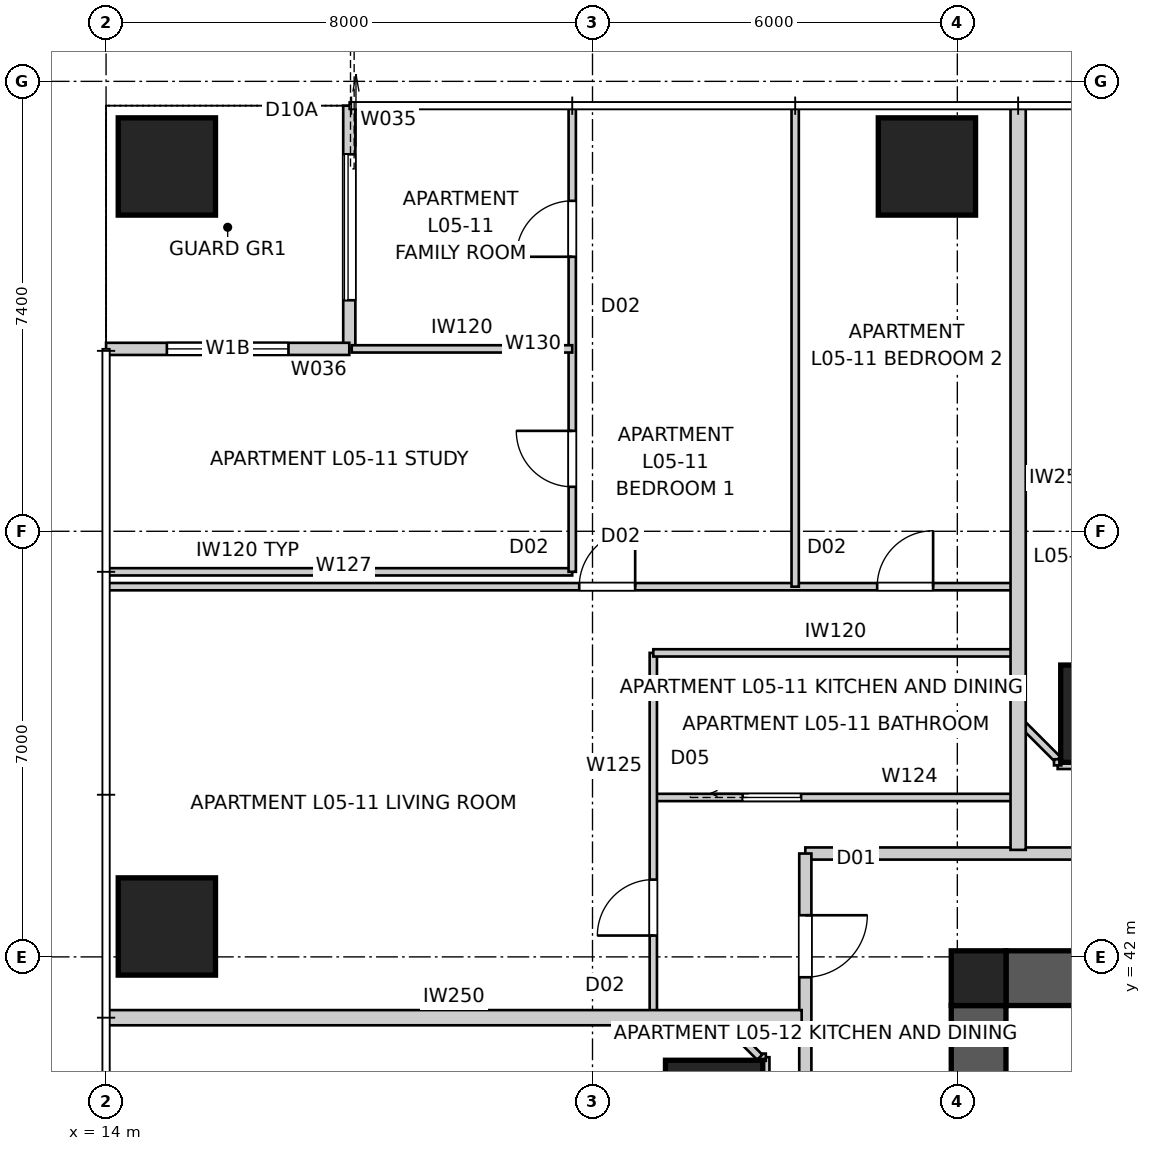
"""IFC4 building model, lengths in metres.
Left out: names, types, materials, properties, quantities, classifications, styles, units other than length and angle.
Written with IfcOpenShell. Run it as: python <this file> out.ifc"""

import sys

from ifc_helpers import new_model, si_unit, direction, frame, frame_2d, origin, origin_2d, place, context, subcontext, project, spatial, polyline, rectangle, outline, extrude, element, fill, save


model = new_model("IFC4")
c1 = context("Model", 3, precision=1e-05, world=origin(), true_north=direction((0.0, 1.0)))
c2 = subcontext(c1, "Body", "Model", "MODEL_VIEW")
j1 = project(units=[si_unit("LENGTHUNIT", "METRE"), si_unit("PLANEANGLEUNIT", "RADIAN")], contexts=[c1])
p1 = place(None, origin())
s1 = spatial("IfcSite", under=j1, at=p1, CompositionType="ELEMENT")
p2 = place(p1, origin())
s2 = spatial("IfcBuilding", under=s1, at=p2, CompositionType="ELEMENT")
p3 = place(p2, frame((0.0, 0.0, 21.8)))
s3 = spatial("IfcBuildingStorey", under=s2, at=p3, CompositionType="ELEMENT", Elevation=21.8)
p4 = place(p3, frame((28.8, 41.65, 0.0), z_axis=(0.0, 0.0, 1.0), x_axis=(1.0, 0.0, 0.0)))
e1 = element("IfcWall", 1, at=p4, inside=s3, PredefinedType="SHEAR", context=c2, shape_type="SweptSolid", body=[
    extrude(outline(polyline([(0.0, -0.45), (22.4, -0.45), (22.4, -0.025), (22.85, -0.025), (22.85, 0.025), (22.4, 0.025), (22.4, 0.45), (0.0, 0.45), (0.0, 0.025), (-0.45, 0.025), (-0.45, -0.025), (0.0, -0.025), (0.0, -0.45)])), origin(), (0.0, 0.0, 1.0), 3.4),
])
p5 = place(p3, frame((28.35, 41.2, 0.0), z_axis=(0.0, 0.0, 1.0), x_axis=(0.0, -1.0, 0.0)))
e2 = element("IfcWall", 2, at=p5, inside=s3, PredefinedType="SHEAR", context=c2, shape_type="SweptSolid", body=[
    extrude(outline(polyline([(0.0, -0.45), (22.4, -0.45), (22.4, -0.025), (22.85, -0.025), (22.85, 0.025), (22.4, 0.025), (22.4, 0.45), (0.0, 0.45), (0.0, 0.025), (-0.45, 0.025), (-0.45, -0.025), (0.0, -0.025), (0.0, -0.45)])), origin(), (0.0, 0.0, 1.0), 3.4),
])
p6 = place(p5, frame((11.14, 0.0, 0.0)))
e3 = element("IfcOpeningElement", 3, at=p6, cuts=e2, PredefinedType="OPENING", context=c2, shape_type="SweptSolid", body=[
    extrude(rectangle(XDim=1.02, YDim=2.4, at=frame_2d((0.51, 1.2))), frame((0.0, 0.46, 0.0), z_axis=(0.0, -1.0, 0.0), x_axis=(1.0, 0.0, 0.0)), (0.0, 0.0, 1.0), 0.92),
])
p7 = place(p3, frame((28.35, 41.65, 0.0), z_axis=(0.0, 0.0, 1.0), x_axis=(1.0, 0.0, 0.0)))
e4 = element("IfcColumn", 4, at=p7, inside=s3, PredefinedType="COLUMN", context=c2, shape_type="SweptSolid", body=[
    extrude(rectangle(XDim=0.9, YDim=0.9, at=origin_2d()), origin(), (0.0, 0.0, 1.0), 3.4),
])
for number, where, z_axis, x_axis in (
    (5, (27.5, 55.0, 0.0), (0.0, 0.0, 1.0), (1.0, 0.0, 0.0)),
    (6, (15.0, 55.0, 0.0), (0.0, 0.0, 1.0), (1.0, 0.0, 0.0)),
    (7, (15.0, 42.5, 0.0), (0.0, 0.0, 1.0), (1.0, 0.0, 0.0)),
    (8, (30.5, 46.0, 0.0), (0.0, 0.0, 1.0), (1.0, 0.0, 0.0)),
    (9, (24.0, 39.5, 0.0), (0.0, 0.0, 1.0), (1.0, 0.0, 0.0)),
):
    element("IfcColumn", number, at=place(p3, frame(where, z_axis=z_axis, x_axis=x_axis)), inside=s3, PredefinedType="COLUMN", context=c2, shape_type="SweptSolid", body=[
        extrude(rectangle(XDim=1.6, YDim=1.6, at=origin_2d()), origin(), (0.0, 0.0, 1.0), 3.4),
    ])
p8 = place(p3, frame((18.0, 56.0, 0.0), z_axis=(0.0, 0.0, 1.0), x_axis=(0.0, -1.0, 0.0)))
e10 = element("IfcWall", 10, at=p8, inside=s3, PredefinedType="SOLIDWALL", context=c2, shape_type="SweptSolid", body=[
    extrude(rectangle(XDim=4.0, YDim=0.2, at=frame_2d((2.0, 0.0))), origin(), (0.0, 0.0, 1.0), 3.25),
])
p9 = place(p8, frame((0.8, 0.0, 0.0)))
e11 = element("IfcOpeningElement", 11, at=p9, cuts=e10, PredefinedType="OPENING", context=c2, shape_type="SweptSolid", body=[
    extrude(rectangle(XDim=2.4, YDim=2.1, at=frame_2d((1.2, 1.05))), frame((0.0, 0.11, 0.0), z_axis=(0.0, -1.0, 0.0), x_axis=(1.0, 0.0, 0.0)), (0.0, 0.0, 1.0), 0.22),
])
p10 = place(p3, frame((18.0, 52.0, 0.0), z_axis=(0.0, 0.0, 1.0), x_axis=(-1.0, 0.0, 0.0)))
e12 = element("IfcWall", 12, at=p10, inside=s3, PredefinedType="SOLIDWALL", context=c2, shape_type="SweptSolid", body=[
    extrude(rectangle(XDim=4.0, YDim=0.2, at=frame_2d((2.0, 0.0))), origin(), (0.0, 0.0, 1.0), 3.25),
])
p11 = place(p10, frame((1.0, 0.0, 0.45)))
e13 = element("IfcOpeningElement", 13, at=p11, cuts=e12, PredefinedType="OPENING", context=c2, shape_type="SweptSolid", body=[
    extrude(rectangle(XDim=2.0, YDim=1.8, at=frame_2d((1.0, 0.9))), frame((0.0, 0.11, 0.0), z_axis=(0.0, -1.0, 0.0), x_axis=(1.0, 0.0, 0.0)), (0.0, 0.0, 1.0), 0.22),
])
p12 = place(p3, frame((54.5, 43.7, 0.0), z_axis=(0.0, 0.0, 1.0), x_axis=(-1.0, 0.0, 0.0)))
e14 = element("IfcWall", 14, at=p12, inside=s3, PredefinedType="PARTITIONING", context=c2, shape_type="SweptSolid", body=[
    extrude(rectangle(XDim=29.0, YDim=0.2, at=frame_2d((14.5, 0.0))), origin(), (0.0, 0.0, 1.0), 3.25),
])
p13 = place(p12, frame((22.253, 0.0, 0.0)))
e15 = element("IfcOpeningElement", 15, at=p13, cuts=e14, PredefinedType="OPENING", context=c2, shape_type="SweptSolid", body=[
    extrude(rectangle(XDim=1.02, YDim=2.34, at=frame_2d((0.51, 1.17))), frame((0.0, 0.11, 0.0), z_axis=(0.0, -1.0, 0.0), x_axis=(1.0, 0.0, 0.0)), (0.0, 0.0, 1.0), 0.22),
])
p14 = place(p12, frame((5.393, 0.0, 0.0)))
e16 = element("IfcOpeningElement", 16, at=p14, cuts=e14, PredefinedType="OPENING", context=c2, shape_type="SweptSolid", body=[
    extrude(rectangle(XDim=1.02, YDim=2.34, at=frame_2d((0.51, 1.17))), frame((0.0, 0.11, 0.0), z_axis=(0.0, -1.0, 0.0), x_axis=(1.0, 0.0, 0.0)), (0.0, 0.0, 1.0), 0.22),
])
p15 = place(p12, frame((1.281, 0.0, 0.0)))
e17 = element("IfcOpeningElement", 17, at=p15, cuts=e14, PredefinedType="OPENING", context=c2, shape_type="SweptSolid", body=[
    extrude(rectangle(XDim=1.02, YDim=2.34, at=frame_2d((0.51, 1.17))), frame((0.0, 0.11, 0.0), z_axis=(0.0, -1.0, 0.0), x_axis=(1.0, 0.0, 0.0)), (0.0, 0.0, 1.0), 0.22),
])
p16 = place(p3, frame((25.5, 43.7, 0.0), z_axis=(0.0, 0.0, 1.0), x_axis=(0.0, -1.0, 0.0)))
e18 = element("IfcWall", 18, at=p16, inside=s3, PredefinedType="PARTITIONING", context=c2, shape_type="SweptSolid", body=[
    extrude(rectangle(XDim=27.4, YDim=0.2, at=frame_2d((13.7, 0.0))), origin(), (0.0, 0.0, 1.0), 3.25),
])
p17 = place(p16, frame((5.493, 0.0, 0.0)))
e19 = element("IfcOpeningElement", 19, at=p17, cuts=e18, PredefinedType="OPENING", context=c2, shape_type="SweptSolid", body=[
    extrude(rectangle(XDim=1.02, YDim=2.34, at=frame_2d((0.51, 1.17))), frame((0.0, 0.11, 0.0), z_axis=(0.0, -1.0, 0.0), x_axis=(1.0, 0.0, 0.0)), (0.0, 0.0, 1.0), 0.22),
])
p18 = place(p16, frame((15.16, 0.0, 0.0)))
e20 = element("IfcOpeningElement", 20, at=p18, cuts=e18, PredefinedType="OPENING", context=c2, shape_type="SweptSolid", body=[
    extrude(rectangle(XDim=1.02, YDim=2.34, at=frame_2d((0.51, 1.17))), frame((0.0, 0.11, 0.0), z_axis=(0.0, -1.0, 0.0), x_axis=(1.0, 0.0, 0.0)), (0.0, 0.0, 1.0), 0.22),
])
p19 = place(p16, frame((25.365, 0.0, 0.0)))
e21 = element("IfcOpeningElement", 21, at=p19, cuts=e18, PredefinedType="OPENING", context=c2, shape_type="SweptSolid", body=[
    extrude(rectangle(XDim=1.02, YDim=2.34, at=frame_2d((0.51, 1.17))), frame((0.0, 0.11, 0.0), z_axis=(0.0, -1.0, 0.0), x_axis=(1.0, 0.0, 0.0)), (0.0, 0.0, 1.0), 0.22),
])
p20 = place(p16, frame((1.015, 0.0, 0.0)))
e22 = element("IfcOpeningElement", 22, at=p20, cuts=e18, PredefinedType="OPENING", context=c2, shape_type="SweptSolid", body=[
    extrude(rectangle(XDim=1.02, YDim=2.34, at=frame_2d((0.51, 1.17))), frame((0.0, 0.11, 0.0), z_axis=(0.0, -1.0, 0.0), x_axis=(1.0, 0.0, 0.0)), (0.0, 0.0, 1.0), 0.22),
])
p21 = place(p3, frame((29.0, 56.0, 0.0), z_axis=(0.0, 0.0, 1.0), x_axis=(0.0, -1.0, 0.0)))
e23 = element("IfcWall", 23, at=p21, inside=s3, PredefinedType="PARTITIONING", context=c2, shape_type="SweptSolid", body=[
    extrude(rectangle(XDim=12.24, YDim=0.25, at=frame_2d((6.12, 0.0))), origin(), (0.0, 0.0, 1.0), 3.25),
])
p22 = place(p3, frame((14.0, 41.0, 0.0), z_axis=(0.0, 0.0, 1.0), x_axis=(1.0, 0.0, 0.0)))
e24 = element("IfcWall", 24, at=p22, inside=s3, PredefinedType="PARTITIONING", context=c2, shape_type="SweptSolid", body=[
    extrude(rectangle(XDim=11.44, YDim=0.25, at=frame_2d((5.72, 0.0))), origin(), (0.0, 0.0, 1.0), 3.25),
])
p23 = place(p3, frame((29.0, 45.9, 0.0), z_axis=(0.0, 0.0, 1.0), x_axis=(0.707106781187, -0.707106781187, 0.0)))
e25 = element("IfcWall", 25, at=p23, inside=s3, PredefinedType="PARTITIONING", context=c2, shape_type="SweptSolid", body=[
    extrude(rectangle(XDim=0.919, YDim=0.12, at=frame_2d((0.459, 0.0))), origin(), (0.0, 0.0, 1.0), 3.25),
])
p24 = place(p3, frame((29.65, 45.15, 0.0), z_axis=(0.0, 0.0, 1.0), x_axis=(1.0, 0.0, 0.0)))
e26 = element("IfcWall", 26, at=p24, inside=s3, PredefinedType="PARTITIONING", context=c2, shape_type="SweptSolid", body=[
    extrude(rectangle(XDim=1.7, YDim=0.12, at=frame_2d((0.85, 0.0))), origin(), (0.0, 0.0, 1.0), 3.25),
])
p25 = place(p3, frame((23.0, 44.622, 0.0), z_axis=(0.0, 0.0, 1.0), x_axis=(1.0, 0.0, 0.0)))
e27 = element("IfcWall", 27, at=p25, inside=s3, PredefinedType="PARTITIONING", context=c2, shape_type="SweptSolid", body=[
    extrude(rectangle(XDim=6.0, YDim=0.12, at=frame_2d((3.0, 0.0))), origin(), (0.0, 0.0, 1.0), 2.638),
])
p26 = place(p25, frame((1.47, 0.0, 0.0)))
e28 = element("IfcOpeningElement", 28, at=p26, cuts=e27, PredefinedType="OPENING", context=c2, shape_type="SweptSolid", body=[
    extrude(rectangle(XDim=0.96, YDim=2.1, at=frame_2d((0.48, 1.05))), frame((0.0, 0.07, 0.0), z_axis=(0.0, -1.0, 0.0), x_axis=(1.0, 0.0, 0.0)), (0.0, 0.0, 1.0), 0.14),
])
p27 = place(p3, frame((23.0, 41.0, 0.0), z_axis=(0.0, 0.0, 1.0), x_axis=(0.0, 1.0, 0.0)))
e29 = element("IfcWall", 29, at=p27, inside=s3, PredefinedType="PARTITIONING", context=c2, shape_type="SweptSolid", body=[
    extrude(rectangle(XDim=6.0, YDim=0.12, at=frame_2d((3.0, 0.0))), origin(), (0.0, 0.0, 1.0), 3.25),
])
p28 = place(p27, frame((1.351, 0.0, 0.0)))
e30 = element("IfcOpeningElement", 30, at=p28, cuts=e29, PredefinedType="OPENING", context=c2, shape_type="SweptSolid", body=[
    extrude(rectangle(XDim=0.92, YDim=2.34, at=frame_2d((0.46, 1.17))), frame((0.0, 0.07, 0.0), z_axis=(0.0, -1.0, 0.0), x_axis=(1.0, 0.0, 0.0)), (0.0, 0.0, 1.0), 0.14),
])
p29 = place(p3, frame((23.0, 47.0, 0.0), z_axis=(0.0, 0.0, 1.0), x_axis=(1.0, 0.0, 0.0)))
e31 = element("IfcWall", 31, at=p29, inside=s3, PredefinedType="PARTITIONING", context=c2, shape_type="SweptSolid", body=[
    extrude(rectangle(XDim=6.0, YDim=0.12, at=frame_2d((3.0, 0.0))), origin(), (0.0, 0.0, 1.0), 3.25),
])
p30 = place(p3, frame((14.04, 48.089, 0.0), z_axis=(0.0, 0.0, 1.0), x_axis=(1.0, 0.0, 0.0)))
e32 = element("IfcWall", 32, at=p30, inside=s3, PredefinedType="PARTITIONING", context=c2, shape_type="SweptSolid", body=[
    extrude(rectangle(XDim=14.96, YDim=0.12, at=frame_2d((7.48, 0.0))), origin(), (0.0, 0.0, 1.0), 3.25),
])
p31 = place(p30, frame((7.742, 0.0, 0.0)))
e33 = element("IfcOpeningElement", 33, at=p31, cuts=e32, PredefinedType="OPENING", context=c2, shape_type="SweptSolid", body=[
    extrude(rectangle(XDim=0.92, YDim=2.34, at=frame_2d((0.46, 1.17))), frame((0.0, 0.07, 0.0), z_axis=(0.0, -1.0, 0.0), x_axis=(1.0, 0.0, 0.0)), (0.0, 0.0, 1.0), 0.14),
])
p32 = place(p30, frame((12.642, 0.0, 0.0)))
e34 = element("IfcOpeningElement", 34, at=p32, cuts=e32, PredefinedType="OPENING", context=c2, shape_type="SweptSolid", body=[
    extrude(rectangle(XDim=0.92, YDim=2.34, at=frame_2d((0.46, 1.17))), frame((0.0, 0.07, 0.0), z_axis=(0.0, -1.0, 0.0), x_axis=(1.0, 0.0, 0.0)), (0.0, 0.0, 1.0), 0.14),
])
p33 = place(p3, frame((25.333, 55.96, 0.0), z_axis=(0.0, 0.0, 1.0), x_axis=(0.0, -1.0, 0.0)))
e35 = element("IfcWall", 35, at=p33, inside=s3, PredefinedType="PARTITIONING", context=c2, shape_type="SweptSolid", body=[
    extrude(rectangle(XDim=7.871, YDim=0.12, at=frame_2d((3.936, 0.0))), origin(), (0.0, 0.0, 1.0), 2.638),
])
p34 = place(p3, frame((14.04, 48.333, 0.0), z_axis=(0.0, 0.0, 1.0), x_axis=(1.0, 0.0, 0.0)))
e36 = element("IfcWall", 36, at=p34, inside=s3, PredefinedType="PARTITIONING", context=c2, shape_type="SweptSolid", body=[
    extrude(rectangle(XDim=7.627, YDim=0.12, at=frame_2d((3.813, 0.0))), origin(), (0.0, 0.0, 1.0), 3.25),
])
p35 = place(p3, frame((21.667, 48.333, 0.0), z_axis=(0.0, 0.0, 1.0), x_axis=(0.0, 1.0, 0.0)))
e37 = element("IfcWall", 37, at=p35, inside=s3, PredefinedType="PARTITIONING", context=c2, shape_type="SweptSolid", body=[
    extrude(rectangle(XDim=7.627, YDim=0.12, at=frame_2d((3.813, 0.0))), origin(), (0.0, 0.0, 1.0), 3.25),
])
p36 = place(p35, frame((5.182, 0.0, 0.0)))
e38 = element("IfcOpeningElement", 38, at=p36, cuts=e37, PredefinedType="OPENING", context=c2, shape_type="SweptSolid", body=[
    extrude(rectangle(XDim=0.92, YDim=2.34, at=frame_2d((0.46, 1.17))), frame((0.0, 0.07, 0.0), z_axis=(0.0, -1.0, 0.0), x_axis=(1.0, 0.0, 0.0)), (0.0, 0.0, 1.0), 0.14),
])
p37 = place(p35, frame((1.398, 0.0, 0.0)))
e39 = element("IfcOpeningElement", 39, at=p37, cuts=e37, PredefinedType="OPENING", context=c2, shape_type="SweptSolid", body=[
    extrude(rectangle(XDim=0.92, YDim=2.34, at=frame_2d((0.46, 1.17))), frame((0.0, 0.07, 0.0), z_axis=(0.0, -1.0, 0.0), x_axis=(1.0, 0.0, 0.0)), (0.0, 0.0, 1.0), 0.14),
])
p38 = place(p3, frame((18.04, 52.0, 0.0), z_axis=(0.0, 0.0, 1.0), x_axis=(1.0, 0.0, 0.0)))
e40 = element("IfcWall", 40, at=p38, inside=s3, PredefinedType="PARTITIONING", context=c2, shape_type="SweptSolid", body=[
    extrude(rectangle(XDim=3.627, YDim=0.12, at=frame_2d((1.813, 0.0))), origin(), (0.0, 0.0, 1.0), 3.25),
])
p39 = place(p3, frame((24.85, 38.65, 0.0), z_axis=(0.0, 0.0, 1.0), x_axis=(0.0, 1.0, 0.0)))
e41 = element("IfcWall", 41, at=p39, inside=s3, PredefinedType="PARTITIONING", context=c2, shape_type="SweptSolid", body=[
    extrude(rectangle(XDim=1.7, YDim=0.12, at=frame_2d((0.85, 0.0))), origin(), (0.0, 0.0, 1.0), 3.25),
])
p40 = place(p3, frame((24.75, 40.35, 0.0), z_axis=(0.0, 0.0, 1.0), x_axis=(-0.707106781187, 0.707106781187, 0.0)))
e42 = element("IfcWall", 42, at=p40, inside=s3, PredefinedType="PARTITIONING", context=c2, shape_type="SweptSolid", body=[
    extrude(rectangle(XDim=0.919, YDim=0.12, at=frame_2d((0.459, 0.0))), origin(), (0.0, 0.0, 1.0), 3.25),
])
for number, where, z_axis, x_axis in (
    (43, (29.65, 45.15, 0.0), (0.0, 0.0, 1.0), (0.0, 1.0, 0.0)),
    (44, (24.85, 40.35, 0.0), (0.0, 0.0, 1.0), (-1.0, 0.0, 0.0)),
):
    element("IfcWall", number, at=place(p3, frame(where, z_axis=z_axis, x_axis=x_axis)), inside=s3, PredefinedType="PARTITIONING", context=c2, shape_type="SweptSolid", body=[
        extrude(rectangle(XDim=0.1, YDim=0.12, at=frame_2d((0.05, 0.0))), origin(), (0.0, 0.0, 1.0), 3.25),
    ])
p41 = place(p9, origin())
e45 = element("IfcDoor", 45, at=p41, inside=s3, OperationType="SLIDING_TO_LEFT", PredefinedType="DOOR", context=c2, shape_type="SweptSolid", body=[
    extrude(rectangle(XDim=2.4, YDim=2.1, at=frame_2d((1.2, 1.05))), frame((0.0, 0.025, 0.0), z_axis=(0.0, -1.0, 0.0), x_axis=(1.0, 0.0, 0.0)), (0.0, 0.0, 1.0), 0.05),
])
fill(e11, e45)
p42 = place(p11, origin())
e46 = element("IfcWindow", 46, at=p42, inside=s3, PartitioningType="SINGLE_PANEL", PredefinedType="WINDOW", context=c2, shape_type="SweptSolid", body=[
    extrude(rectangle(XDim=2.0, YDim=1.8, at=frame_2d((1.0, 0.9))), frame((0.0, 0.03, 0.0), z_axis=(0.0, -1.0, 0.0), x_axis=(1.0, 0.0, 0.0)), (0.0, 0.0, 1.0), 0.06),
])
fill(e13, e46)
p43 = place(p20, origin())
e47 = element("IfcDoor", 47, at=p43, inside=s3, OperationType="SINGLE_SWING_LEFT", PredefinedType="DOOR", context=c2, shape_type="SweptSolid", body=[
    extrude(rectangle(XDim=1.02, YDim=2.34, at=frame_2d((0.51, 1.17))), frame((0.0, 0.025, 0.0), z_axis=(0.0, -1.0, 0.0), x_axis=(1.0, 0.0, 0.0)), (0.0, 0.0, 1.0), 0.05),
])
fill(e22, e47)
p44 = place(p26, origin())
e48 = element("IfcDoor", 48, at=p44, inside=s3, OperationType="SLIDING_TO_LEFT", PredefinedType="DOOR", context=c2, shape_type="SweptSolid", body=[
    extrude(rectangle(XDim=0.96, YDim=2.1, at=frame_2d((0.48, 1.05))), frame((0.0, 0.025, 0.0), z_axis=(0.0, -1.0, 0.0), x_axis=(1.0, 0.0, 0.0)), (0.0, 0.0, 1.0), 0.05),
])
fill(e28, e48)
p45 = place(p28, origin())
e49 = element("IfcDoor", 49, at=p45, inside=s3, OperationType="SINGLE_SWING_LEFT", PredefinedType="DOOR", context=c2, shape_type="SweptSolid", body=[
    extrude(rectangle(XDim=0.92, YDim=2.34, at=frame_2d((0.46, 1.17))), frame((0.0, 0.025, 0.0), z_axis=(0.0, -1.0, 0.0), x_axis=(1.0, 0.0, 0.0)), (0.0, 0.0, 1.0), 0.05),
])
fill(e30, e49)
p46 = place(p31, origin())
e50 = element("IfcDoor", 50, at=p46, inside=s3, OperationType="SINGLE_SWING_RIGHT", PredefinedType="DOOR", context=c2, shape_type="SweptSolid", body=[
    extrude(rectangle(XDim=0.92, YDim=2.34, at=frame_2d((0.46, 1.17))), frame((0.0, 0.025, 0.0), z_axis=(0.0, -1.0, 0.0), x_axis=(1.0, 0.0, 0.0)), (0.0, 0.0, 1.0), 0.05),
])
fill(e33, e50)
p47 = place(p32, origin())
e51 = element("IfcDoor", 51, at=p47, inside=s3, OperationType="SINGLE_SWING_RIGHT", PredefinedType="DOOR", context=c2, shape_type="SweptSolid", body=[
    extrude(rectangle(XDim=0.92, YDim=2.34, at=frame_2d((0.46, 1.17))), frame((0.0, 0.025, 0.0), z_axis=(0.0, -1.0, 0.0), x_axis=(1.0, 0.0, 0.0)), (0.0, 0.0, 1.0), 0.05),
])
fill(e34, e51)
p48 = place(p36, origin())
e52 = element("IfcDoor", 52, at=p48, inside=s3, OperationType="SINGLE_SWING_LEFT", PredefinedType="DOOR", context=c2, shape_type="SweptSolid", body=[
    extrude(rectangle(XDim=0.92, YDim=2.34, at=frame_2d((0.46, 1.17))), frame((0.0, 0.025, 0.0), z_axis=(0.0, -1.0, 0.0), x_axis=(1.0, 0.0, 0.0)), (0.0, 0.0, 1.0), 0.05),
])
fill(e38, e52)
p49 = place(p37, origin())
e53 = element("IfcDoor", 53, at=p49, inside=s3, OperationType="SINGLE_SWING_RIGHT", PredefinedType="DOOR", context=c2, shape_type="SweptSolid", body=[
    extrude(rectangle(XDim=0.92, YDim=2.34, at=frame_2d((0.46, 1.17))), frame((0.0, 0.025, 0.0), z_axis=(0.0, -1.0, 0.0), x_axis=(1.0, 0.0, 0.0)), (0.0, 0.0, 1.0), 0.05),
])
fill(e39, e53)
save(model, sys.argv[1])
